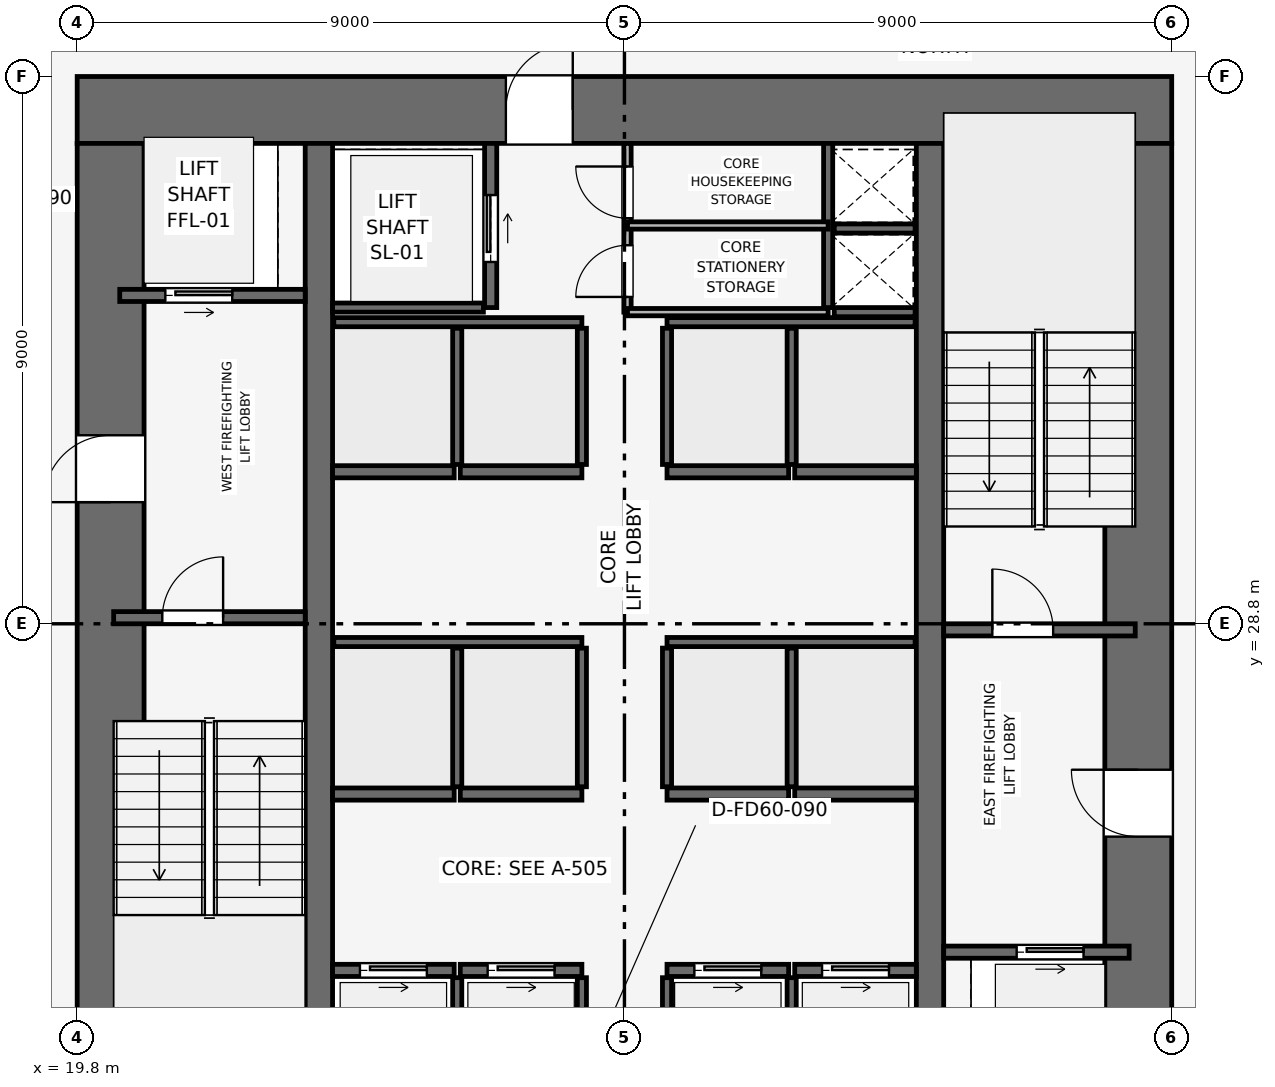
"""IFC4 building model, lengths in metres.
Left out: names, types, materials, properties, quantities, classifications, styles, units other than length and angle.
Written with IfcOpenShell. Run it as: python <this file> out.ifc"""

import sys

from ifc_helpers import new_model, si_unit, direction, frame, frame_2d, origin, place, context, subcontext, project, spatial, rectangle, extrude, element, fill, save


model = new_model("IFC4")
c1 = context("Model", 3, precision=1e-05, world=origin(), true_north=direction((0.0, 1.0)))
c2 = subcontext(c1, "Body", "Model", "MODEL_VIEW")
j1 = project(units=[si_unit("LENGTHUNIT", "METRE"), si_unit("PLANEANGLEUNIT", "RADIAN")], contexts=[c1])
p1 = place(None, origin())
s1 = spatial("IfcSite", under=j1, at=p1, CompositionType="ELEMENT")
p2 = place(p1, origin())
s2 = spatial("IfcBuilding", under=s1, at=p2, CompositionType="ELEMENT")
p3 = place(p2, frame((0.0, 0.0, 92.4)))
s3 = spatial("IfcBuildingStorey", under=s2, at=p3, CompositionType="ELEMENT", Elevation=92.4)
p4 = place(p3, frame((19.8, 37.25, 0.0), z_axis=(0.0, 0.0, 1.0), x_axis=(1.0, 0.0, 0.0)))
e1 = element("IfcWall", 1, at=p4, inside=s3, PredefinedType="SHEAR", context=c2, shape_type="SweptSolid", body=[
    extrude(rectangle(XDim=18.0, YDim=1.1, at=frame_2d((9.0, 0.0))), origin(), (0.0, 0.0, 1.0), 3.9),
])
p5 = place(p4, frame((7.05, 0.0, 0.0)))
e2 = element("IfcOpeningElement", 2, at=p5, cuts=e1, PredefinedType="OPENING", context=c2, shape_type="SweptSolid", body=[
    extrude(rectangle(XDim=1.1, YDim=2.15, at=frame_2d((0.55, 1.075))), frame((0.0, 0.56, 0.0), z_axis=(0.0, -1.0, 0.0), x_axis=(1.0, 0.0, 0.0)), (0.0, 0.0, 1.0), 1.12),
])
p6 = place(p3, frame((20.35, 20.9, 0.0), z_axis=(0.0, 0.0, 1.0), x_axis=(0.0, 1.0, 0.0)))
e3 = element("IfcWall", 3, at=p6, inside=s3, PredefinedType="SHEAR", context=c2, shape_type="SweptSolid", body=[
    extrude(rectangle(XDim=15.8, YDim=1.1, at=frame_2d((7.9, 0.0))), origin(), (0.0, 0.0, 1.0), 3.9),
])
p7 = place(p6, frame((9.9, 0.0, 0.0)))
e4 = element("IfcOpeningElement", 4, at=p7, cuts=e3, PredefinedType="OPENING", context=c2, shape_type="SweptSolid", body=[
    extrude(rectangle(XDim=1.1, YDim=2.15, at=frame_2d((0.55, 1.075))), frame((0.0, 0.56, 0.0), z_axis=(0.0, -1.0, 0.0), x_axis=(1.0, 0.0, 0.0)), (0.0, 0.0, 1.0), 1.12),
])
p8 = place(p3, frame((37.25, 20.9, 0.0), z_axis=(0.0, 0.0, 1.0), x_axis=(0.0, 1.0, 0.0)))
e5 = element("IfcWall", 5, at=p8, inside=s3, PredefinedType="SHEAR", context=c2, shape_type="SweptSolid", body=[
    extrude(rectangle(XDim=15.8, YDim=1.1, at=frame_2d((7.9, 0.0))), origin(), (0.0, 0.0, 1.0), 3.9),
])
p9 = place(p8, frame((4.4, 0.0, 0.0)))
e6 = element("IfcOpeningElement", 6, at=p9, cuts=e5, PredefinedType="OPENING", context=c2, shape_type="SweptSolid", body=[
    extrude(rectangle(XDim=1.1, YDim=2.15, at=frame_2d((0.55, 1.075))), frame((0.0, 0.56, 0.0), z_axis=(0.0, -1.0, 0.0), x_axis=(1.0, 0.0, 0.0)), (0.0, 0.0, 1.0), 1.12),
])
for number, where, z_axis, x_axis in (
    (7, (23.775, 20.9, 0.0), (0.0, 0.0, 1.0), (0.0, 1.0, 0.0)),
    (8, (33.825, 20.9, 0.0), (0.0, 0.0, 1.0), (0.0, 1.0, 0.0)),
):
    element("IfcWall", number, at=place(p3, frame(where, z_axis=z_axis, x_axis=x_axis)), inside=s3, PredefinedType="SHEAR", context=c2, shape_type="SweptSolid", body=[
        extrude(rectangle(XDim=15.8, YDim=0.45, at=frame_2d((7.9, 0.0))), origin(), (0.0, 0.0, 1.0), 3.9),
    ])
p10 = place(p3, frame((20.4, 28.9, 0.0), z_axis=(0.0, 0.0, 1.0), x_axis=(1.0, 0.0, 0.0)))
e9 = element("IfcWall", 9, at=p10, inside=s3, PredefinedType="SHEAR", context=c2, shape_type="SweptSolid", body=[
    extrude(rectangle(XDim=3.15, YDim=0.2, at=frame_2d((1.575, 0.0))), origin(), (0.0, 0.0, 1.0), 3.65),
])
p11 = place(p10, frame((0.8, 0.0, 0.0)))
e10 = element("IfcOpeningElement", 10, at=p11, cuts=e9, PredefinedType="OPENING", context=c2, shape_type="SweptSolid", body=[
    extrude(rectangle(XDim=1.0, YDim=2.1, at=frame_2d((0.5, 1.05))), frame((0.0, 0.11, 0.0), z_axis=(0.0, -1.0, 0.0), x_axis=(1.0, 0.0, 0.0)), (0.0, 0.0, 1.0), 0.22),
])
p12 = place(p3, frame((34.05, 28.7, 0.0), z_axis=(0.0, 0.0, 1.0), x_axis=(1.0, 0.0, 0.0)))
e11 = element("IfcWall", 11, at=p12, inside=s3, PredefinedType="SHEAR", context=c2, shape_type="SweptSolid", body=[
    extrude(rectangle(XDim=3.15, YDim=0.2, at=frame_2d((1.575, 0.0))), origin(), (0.0, 0.0, 1.0), 3.65),
])
p13 = place(p12, frame((0.8, 0.0, 0.0)))
e12 = element("IfcOpeningElement", 12, at=p13, cuts=e11, PredefinedType="OPENING", context=c2, shape_type="SweptSolid", body=[
    extrude(rectangle(XDim=1.0, YDim=2.1, at=frame_2d((0.5, 1.05))), frame((0.0, 0.11, 0.0), z_axis=(0.0, -1.0, 0.0), x_axis=(1.0, 0.0, 0.0)), (0.0, 0.0, 1.0), 0.22),
])
p14 = place(p3, frame((32.15, 34.0, 0.0), z_axis=(0.0, 0.0, 1.0), x_axis=(0.0, 1.0, 0.0)))
e13 = element("IfcWall", 13, at=p14, inside=s3, PredefinedType="SHEAR", context=c2, shape_type="SweptSolid", body=[
    extrude(rectangle(XDim=2.7, YDim=0.15, at=frame_2d((1.35, 0.0))), origin(), (0.0, 0.0, 1.0), 3.65),
])
for number, where, z_axis, x_axis in (
    (14, (32.25, 33.925, 0.0), (0.0, 0.0, 1.0), (1.0, 0.0, 0.0)),
    (15, (32.25, 35.3, 0.0), (0.0, 0.0, 1.0), (1.0, 0.0, 0.0)),
):
    element("IfcWall", number, at=place(p3, frame(where, z_axis=z_axis, x_axis=x_axis)), inside=s3, PredefinedType="SHEAR", context=c2, shape_type="SweptSolid", body=[
        extrude(rectangle(XDim=1.33, YDim=0.15, at=frame_2d((0.665, 0.0))), origin(), (0.0, 0.0, 1.0), 3.65),
    ])
p15 = place(p3, frame((20.5, 34.2, 0.0), z_axis=(0.0, 0.0, 1.0), x_axis=(1.0, 0.0, 0.0)))
e16 = element("IfcWall", 16, at=p15, inside=s3, PredefinedType="SHEAR", context=c2, shape_type="SweptSolid", body=[
    extrude(rectangle(XDim=3.05, YDim=0.2, at=frame_2d((1.525, 0.0))), origin(), (0.0, 0.0, 1.0), 3.65),
])
p16 = place(p15, frame((0.75, 0.0, 0.0)))
e17 = element("IfcOpeningElement", 17, at=p16, cuts=e16, PredefinedType="OPENING", context=c2, shape_type="SweptSolid", body=[
    extrude(rectangle(XDim=1.1, YDim=2.15, at=frame_2d((0.55, 1.075))), frame((0.0, 0.11, 0.0), z_axis=(0.0, -1.0, 0.0), x_axis=(1.0, 0.0, 0.0)), (0.0, 0.0, 1.0), 0.22),
])
p17 = place(p3, frame((34.05, 23.4, 0.0), z_axis=(0.0, 0.0, 1.0), x_axis=(1.0, 0.0, 0.0)))
e18 = element("IfcWall", 18, at=p17, inside=s3, PredefinedType="SHEAR", context=c2, shape_type="SweptSolid", body=[
    extrude(rectangle(XDim=3.05, YDim=0.2, at=frame_2d((1.525, 0.0))), origin(), (0.0, 0.0, 1.0), 3.65),
])
p18 = place(p17, frame((1.2, 0.0, 0.0)))
e19 = element("IfcOpeningElement", 19, at=p18, cuts=e18, PredefinedType="OPENING", context=c2, shape_type="SweptSolid", body=[
    extrude(rectangle(XDim=1.1, YDim=2.15, at=frame_2d((0.55, 1.075))), frame((0.0, 0.11, 0.0), z_axis=(0.0, -1.0, 0.0), x_axis=(1.0, 0.0, 0.0)), (0.0, 0.0, 1.0), 0.22),
])
p19 = place(p3, frame((26.6, 34.0, 0.0), z_axis=(0.0, 0.0, 1.0), x_axis=(0.0, 1.0, 0.0)))
e20 = element("IfcWall", 20, at=p19, inside=s3, PredefinedType="SHEAR", context=c2, shape_type="SweptSolid", body=[
    extrude(rectangle(XDim=2.7, YDim=0.2, at=frame_2d((1.35, 0.0))), origin(), (0.0, 0.0, 1.0), 3.65),
])
p20 = place(p19, frame((0.75, 0.0, 0.0)))
e21 = element("IfcOpeningElement", 21, at=p20, cuts=e20, PredefinedType="OPENING", context=c2, shape_type="SweptSolid", body=[
    extrude(rectangle(XDim=1.1, YDim=2.15, at=frame_2d((0.55, 1.075))), frame((0.0, 0.11, 0.0), z_axis=(0.0, -1.0, 0.0), x_axis=(1.0, 0.0, 0.0)), (0.0, 0.0, 1.0), 0.22),
])
p21 = place(p3, frame((24.0, 34.0, 0.0), z_axis=(0.0, 0.0, 1.0), x_axis=(1.0, 0.0, 0.0)))
e22 = element("IfcWall", 22, at=p21, inside=s3, PredefinedType="SHEAR", context=c2, shape_type="SweptSolid", body=[
    extrude(rectangle(XDim=2.48, YDim=0.15, at=frame_2d((1.24, 0.0))), origin(), (0.0, 0.0, 1.0), 3.65),
])
p22 = place(p3, frame((24.0, 23.1, 0.0), z_axis=(0.0, 0.0, 1.0), x_axis=(1.0, 0.0, 0.0)))
e23 = element("IfcWall", 23, at=p22, inside=s3, PredefinedType="SHEAR", context=c2, shape_type="SweptSolid", body=[
    extrude(rectangle(XDim=2.0, YDim=0.2, at=frame_2d((1.0, 0.0))), origin(), (0.0, 0.0, 1.0), 3.65),
])
p23 = place(p22, frame((0.45, 0.0, 0.0)))
e24 = element("IfcOpeningElement", 24, at=p23, cuts=e23, PredefinedType="OPENING", context=c2, shape_type="SweptSolid", body=[
    extrude(rectangle(XDim=1.1, YDim=2.15, at=frame_2d((0.55, 1.075))), frame((0.0, 0.11, 0.0), z_axis=(0.0, -1.0, 0.0), x_axis=(1.0, 0.0, 0.0)), (0.0, 0.0, 1.0), 0.22),
])
p24 = place(p3, frame((26.1, 23.1, 0.0), z_axis=(0.0, 0.0, 1.0), x_axis=(1.0, 0.0, 0.0)))
e25 = element("IfcWall", 25, at=p24, inside=s3, PredefinedType="SHEAR", context=c2, shape_type="SweptSolid", body=[
    extrude(rectangle(XDim=2.0, YDim=0.2, at=frame_2d((1.0, 0.0))), origin(), (0.0, 0.0, 1.0), 3.65),
])
p25 = place(p24, frame((0.45, 0.0, 0.0)))
e26 = element("IfcOpeningElement", 26, at=p25, cuts=e25, PredefinedType="OPENING", context=c2, shape_type="SweptSolid", body=[
    extrude(rectangle(XDim=1.1, YDim=2.15, at=frame_2d((0.55, 1.075))), frame((0.0, 0.11, 0.0), z_axis=(0.0, -1.0, 0.0), x_axis=(1.0, 0.0, 0.0)), (0.0, 0.0, 1.0), 0.22),
])
p26 = place(p3, frame((29.5, 23.1, 0.0), z_axis=(0.0, 0.0, 1.0), x_axis=(1.0, 0.0, 0.0)))
e27 = element("IfcWall", 27, at=p26, inside=s3, PredefinedType="SHEAR", context=c2, shape_type="SweptSolid", body=[
    extrude(rectangle(XDim=2.0, YDim=0.2, at=frame_2d((1.0, 0.0))), origin(), (0.0, 0.0, 1.0), 3.65),
])
p27 = place(p26, frame((0.45, 0.0, 0.0)))
e28 = element("IfcOpeningElement", 28, at=p27, cuts=e27, PredefinedType="OPENING", context=c2, shape_type="SweptSolid", body=[
    extrude(rectangle(XDim=1.1, YDim=2.15, at=frame_2d((0.55, 1.075))), frame((0.0, 0.11, 0.0), z_axis=(0.0, -1.0, 0.0), x_axis=(1.0, 0.0, 0.0)), (0.0, 0.0, 1.0), 0.22),
])
p28 = place(p3, frame((31.6, 23.1, 0.0), z_axis=(0.0, 0.0, 1.0), x_axis=(1.0, 0.0, 0.0)))
e29 = element("IfcWall", 29, at=p28, inside=s3, PredefinedType="SHEAR", context=c2, shape_type="SweptSolid", body=[
    extrude(rectangle(XDim=2.0, YDim=0.2, at=frame_2d((1.0, 0.0))), origin(), (0.0, 0.0, 1.0), 3.65),
])
p29 = place(p28, frame((0.45, 0.0, 0.0)))
e30 = element("IfcOpeningElement", 30, at=p29, cuts=e29, PredefinedType="OPENING", context=c2, shape_type="SweptSolid", body=[
    extrude(rectangle(XDim=1.1, YDim=2.15, at=frame_2d((0.55, 1.075))), frame((0.0, 0.11, 0.0), z_axis=(0.0, -1.0, 0.0), x_axis=(1.0, 0.0, 0.0)), (0.0, 0.0, 1.0), 0.22),
])
for number, where, z_axis, x_axis in (
    (31, (24.0, 26.0, 0.0), (0.0, 0.0, 1.0), (1.0, 0.0, 0.0)),
    (32, (26.1, 26.0, 0.0), (0.0, 0.0, 1.0), (1.0, 0.0, 0.0)),
    (33, (29.5, 26.0, 0.0), (0.0, 0.0, 1.0), (1.0, 0.0, 0.0)),
    (34, (31.6, 26.0, 0.0), (0.0, 0.0, 1.0), (1.0, 0.0, 0.0)),
    (35, (24.0, 31.3, 0.0), (0.0, 0.0, 1.0), (1.0, 0.0, 0.0)),
    (36, (26.1, 31.3, 0.0), (0.0, 0.0, 1.0), (1.0, 0.0, 0.0)),
    (37, (29.5, 31.3, 0.0), (0.0, 0.0, 1.0), (1.0, 0.0, 0.0)),
    (38, (31.6, 31.3, 0.0), (0.0, 0.0, 1.0), (1.0, 0.0, 0.0)),
):
    element("IfcWall", number, at=place(p3, frame(where, z_axis=z_axis, x_axis=x_axis)), inside=s3, PredefinedType="SHEAR", context=c2, shape_type="SweptSolid", body=[
        extrude(rectangle(XDim=2.0, YDim=0.2, at=frame_2d((1.0, 0.0))), origin(), (0.0, 0.0, 1.0), 3.65),
    ])
for number, where, z_axis, x_axis in (
    (39, (26.05, 20.92, 0.0), (0.0, 0.0, 1.0), (0.0, 1.0, 0.0)),
    (40, (28.1, 20.92, 0.0), (0.0, 0.0, 1.0), (0.0, 1.0, 0.0)),
    (41, (29.5, 20.92, 0.0), (0.0, 0.0, 1.0), (0.0, 1.0, 0.0)),
    (42, (31.55, 20.92, 0.0), (0.0, 0.0, 1.0), (0.0, 1.0, 0.0)),
):
    element("IfcWall", number, at=place(p3, frame(where, z_axis=z_axis, x_axis=x_axis)), inside=s3, PredefinedType="SHEAR", context=c2, shape_type="SweptSolid", body=[
        extrude(rectangle(XDim=2.06, YDim=0.15, at=frame_2d((1.03, 0.0))), origin(), (0.0, 0.0, 1.0), 3.65),
    ])
for number, where, z_axis, x_axis in (
    (43, (24.02, 28.5, 0.0), (0.0, 0.0, 1.0), (1.0, 0.0, 0.0)),
    (44, (29.5, 28.5, 0.0), (0.0, 0.0, 1.0), (1.0, 0.0, 0.0)),
):
    element("IfcWall", number, at=place(p3, frame(where, z_axis=z_axis, x_axis=x_axis)), inside=s3, PredefinedType="SHEAR", context=c2, shape_type="SweptSolid", body=[
        extrude(rectangle(XDim=4.08, YDim=0.15, at=frame_2d((2.04, 0.0))), origin(), (0.0, 0.0, 1.0), 3.65),
    ])
for number, where, z_axis, x_axis in (
    (45, (26.05, 26.12, 0.0), (0.0, 0.0, 1.0), (0.0, 1.0, 0.0)),
    (46, (28.1, 26.12, 0.0), (0.0, 0.0, 1.0), (0.0, 1.0, 0.0)),
    (47, (29.5, 26.12, 0.0), (0.0, 0.0, 1.0), (0.0, 1.0, 0.0)),
    (48, (31.55, 26.12, 0.0), (0.0, 0.0, 1.0), (0.0, 1.0, 0.0)),
):
    element("IfcWall", number, at=place(p3, frame(where, z_axis=z_axis, x_axis=x_axis)), inside=s3, PredefinedType="SHEAR", context=c2, shape_type="SweptSolid", body=[
        extrude(rectangle(XDim=2.28, YDim=0.15, at=frame_2d((1.14, 0.0))), origin(), (0.0, 0.0, 1.0), 3.65),
    ])
for number, where, z_axis, x_axis in (
    (49, (24.02, 33.76, 0.0), (0.0, 0.0, 1.0), (1.0, 0.0, 0.0)),
    (50, (29.5, 33.76, 0.0), (0.0, 0.0, 1.0), (1.0, 0.0, 0.0)),
):
    element("IfcWall", number, at=place(p3, frame(where, z_axis=z_axis, x_axis=x_axis)), inside=s3, PredefinedType="SHEAR", context=c2, shape_type="SweptSolid", body=[
        extrude(rectangle(XDim=4.08, YDim=0.15, at=frame_2d((2.04, 0.0))), origin(), (0.0, 0.0, 1.0), 3.65),
    ])
for number, where, z_axis, x_axis in (
    (51, (26.05, 31.42, 0.0), (0.0, 0.0, 1.0), (0.0, 1.0, 0.0)),
    (52, (28.1, 31.42, 0.0), (0.0, 0.0, 1.0), (0.0, 1.0, 0.0)),
    (53, (29.5, 31.42, 0.0), (0.0, 0.0, 1.0), (0.0, 1.0, 0.0)),
    (54, (31.55, 31.42, 0.0), (0.0, 0.0, 1.0), (0.0, 1.0, 0.0)),
):
    element("IfcWall", number, at=place(p3, frame(where, z_axis=z_axis, x_axis=x_axis)), inside=s3, PredefinedType="SHEAR", context=c2, shape_type="SweptSolid", body=[
        extrude(rectangle(XDim=2.24, YDim=0.15, at=frame_2d((1.12, 0.0))), origin(), (0.0, 0.0, 1.0), 3.65),
    ])
p30 = place(p3, frame((28.85, 33.925, 0.0), z_axis=(0.0, 0.0, 1.0), x_axis=(0.0, 1.0, 0.0)))
e55 = element("IfcWall", 55, at=p30, inside=s3, PredefinedType="PARTITIONING", context=c2, shape_type="SweptSolid", body=[
    extrude(rectangle(XDim=2.775, YDim=0.12, at=frame_2d((1.387, 0.0))), origin(), (0.0, 0.0, 1.0), 3.65),
])
p31 = place(p30, frame((0.25, 0.0, 0.0)))
e56 = element("IfcOpeningElement", 56, at=p31, cuts=e55, PredefinedType="OPENING", context=c2, shape_type="SweptSolid", body=[
    extrude(rectangle(XDim=0.85, YDim=2.1, at=frame_2d((0.425, 1.05))), frame((0.0, 0.07, 0.0), z_axis=(0.0, -1.0, 0.0), x_axis=(1.0, 0.0, 0.0)), (0.0, 0.0, 1.0), 0.14),
])
p32 = place(p30, frame((1.545, 0.0, 0.0)))
e57 = element("IfcOpeningElement", 57, at=p32, cuts=e55, PredefinedType="OPENING", context=c2, shape_type="SweptSolid", body=[
    extrude(rectangle(XDim=0.85, YDim=2.1, at=frame_2d((0.425, 1.05))), frame((0.0, 0.07, 0.0), z_axis=(0.0, -1.0, 0.0), x_axis=(1.0, 0.0, 0.0)), (0.0, 0.0, 1.0), 0.14),
])
for number, where, z_axis, x_axis in (
    (58, (28.85, 35.35, 0.0), (0.0, 0.0, 1.0), (1.0, 0.0, 0.0)),
    (59, (28.85, 33.925, 0.0), (0.0, 0.0, 1.0), (1.0, 0.0, 0.0)),
):
    element("IfcWall", number, at=place(p3, frame(where, z_axis=z_axis, x_axis=x_axis)), inside=s3, PredefinedType="PARTITIONING", context=c2, shape_type="SweptSolid", body=[
        extrude(rectangle(XDim=3.3, YDim=0.12, at=frame_2d((1.65, 0.0))), origin(), (0.0, 0.0, 1.0), 3.65),
    ])
p33 = place(p11, origin())
e60 = element("IfcDoor", 60, at=p33, inside=s3, OperationType="SINGLE_SWING_RIGHT", PredefinedType="DOOR", context=c2, shape_type="SweptSolid", body=[
    extrude(rectangle(XDim=1.0, YDim=2.1, at=frame_2d((0.5, 1.05))), frame((0.0, 0.025, 0.0), z_axis=(0.0, -1.0, 0.0), x_axis=(1.0, 0.0, 0.0)), (0.0, 0.0, 1.0), 0.05),
])
fill(e10, e60)
p34 = place(p13, origin())
e61 = element("IfcDoor", 61, at=p34, inside=s3, OperationType="SINGLE_SWING_LEFT", PredefinedType="DOOR", context=c2, shape_type="SweptSolid", body=[
    extrude(rectangle(XDim=1.0, YDim=2.1, at=frame_2d((0.5, 1.05))), frame((0.0, 0.025, 0.0), z_axis=(0.0, -1.0, 0.0), x_axis=(1.0, 0.0, 0.0)), (0.0, 0.0, 1.0), 0.05),
])
fill(e12, e61)
p35 = place(p16, origin())
e62 = element("IfcDoor", 62, at=p35, inside=s3, OperationType="SLIDING_TO_RIGHT", PredefinedType="DOOR", context=c2, shape_type="SweptSolid", body=[
    extrude(rectangle(XDim=1.1, YDim=2.15, at=frame_2d((0.55, 1.075))), frame((0.0, 0.025, 0.0), z_axis=(0.0, -1.0, 0.0), x_axis=(1.0, 0.0, 0.0)), (0.0, 0.0, 1.0), 0.05),
])
fill(e17, e62)
p36 = place(p18, origin())
e63 = element("IfcDoor", 63, at=p36, inside=s3, OperationType="SLIDING_TO_RIGHT", PredefinedType="DOOR", context=c2, shape_type="SweptSolid", body=[
    extrude(rectangle(XDim=1.1, YDim=2.15, at=frame_2d((0.55, 1.075))), frame((0.0, 0.025, 0.0), z_axis=(0.0, -1.0, 0.0), x_axis=(1.0, 0.0, 0.0)), (0.0, 0.0, 1.0), 0.05),
])
fill(e19, e63)
p37 = place(p20, origin())
e64 = element("IfcDoor", 64, at=p37, inside=s3, OperationType="SLIDING_TO_RIGHT", PredefinedType="DOOR", context=c2, shape_type="SweptSolid", body=[
    extrude(rectangle(XDim=1.1, YDim=2.15, at=frame_2d((0.55, 1.075))), frame((0.0, 0.025, 0.0), z_axis=(0.0, -1.0, 0.0), x_axis=(1.0, 0.0, 0.0)), (0.0, 0.0, 1.0), 0.05),
])
fill(e21, e64)
p38 = place(p23, origin())
e65 = element("IfcDoor", 65, at=p38, inside=s3, OperationType="SLIDING_TO_RIGHT", PredefinedType="DOOR", context=c2, shape_type="SweptSolid", body=[
    extrude(rectangle(XDim=1.1, YDim=2.15, at=frame_2d((0.55, 1.075))), frame((0.0, 0.025, 0.0), z_axis=(0.0, -1.0, 0.0), x_axis=(1.0, 0.0, 0.0)), (0.0, 0.0, 1.0), 0.05),
])
fill(e24, e65)
p39 = place(p25, origin())
e66 = element("IfcDoor", 66, at=p39, inside=s3, OperationType="SLIDING_TO_RIGHT", PredefinedType="DOOR", context=c2, shape_type="SweptSolid", body=[
    extrude(rectangle(XDim=1.1, YDim=2.15, at=frame_2d((0.55, 1.075))), frame((0.0, 0.025, 0.0), z_axis=(0.0, -1.0, 0.0), x_axis=(1.0, 0.0, 0.0)), (0.0, 0.0, 1.0), 0.05),
])
fill(e26, e66)
p40 = place(p27, origin())
e67 = element("IfcDoor", 67, at=p40, inside=s3, OperationType="SLIDING_TO_RIGHT", PredefinedType="DOOR", context=c2, shape_type="SweptSolid", body=[
    extrude(rectangle(XDim=1.1, YDim=2.15, at=frame_2d((0.55, 1.075))), frame((0.0, 0.025, 0.0), z_axis=(0.0, -1.0, 0.0), x_axis=(1.0, 0.0, 0.0)), (0.0, 0.0, 1.0), 0.05),
])
fill(e28, e67)
p41 = place(p29, origin())
e68 = element("IfcDoor", 68, at=p41, inside=s3, OperationType="SLIDING_TO_RIGHT", PredefinedType="DOOR", context=c2, shape_type="SweptSolid", body=[
    extrude(rectangle(XDim=1.1, YDim=2.15, at=frame_2d((0.55, 1.075))), frame((0.0, 0.025, 0.0), z_axis=(0.0, -1.0, 0.0), x_axis=(1.0, 0.0, 0.0)), (0.0, 0.0, 1.0), 0.05),
])
fill(e30, e68)
p42 = place(p31, origin())
e69 = element("IfcDoor", 69, at=p42, inside=s3, OperationType="SINGLE_SWING_LEFT", PredefinedType="DOOR", context=c2, shape_type="SweptSolid", body=[
    extrude(rectangle(XDim=0.85, YDim=2.1, at=frame_2d((0.425, 1.05))), frame((0.0, 0.025, 0.0), z_axis=(0.0, -1.0, 0.0), x_axis=(1.0, 0.0, 0.0)), (0.0, 0.0, 1.0), 0.05),
])
fill(e56, e69)
p43 = place(p32, origin())
e70 = element("IfcDoor", 70, at=p43, inside=s3, OperationType="SINGLE_SWING_RIGHT", PredefinedType="DOOR", context=c2, shape_type="SweptSolid", body=[
    extrude(rectangle(XDim=0.85, YDim=2.1, at=frame_2d((0.425, 1.05))), frame((0.0, 0.025, 0.0), z_axis=(0.0, -1.0, 0.0), x_axis=(1.0, 0.0, 0.0)), (0.0, 0.0, 1.0), 0.05),
])
fill(e57, e70)
p44 = place(p7, origin())
e71 = element("IfcDoor", 71, at=p44, inside=s3, OperationType="SINGLE_SWING_LEFT", PredefinedType="DOOR", context=c2, shape_type="SweptSolid", body=[
    extrude(rectangle(XDim=1.1, YDim=2.15, at=frame_2d((0.55, 1.075))), frame((0.0, 0.025, 0.0), z_axis=(0.0, -1.0, 0.0), x_axis=(1.0, 0.0, 0.0)), (0.0, 0.0, 1.0), 0.05),
])
fill(e4, e71)
p45 = place(p9, origin())
e72 = element("IfcDoor", 72, at=p45, inside=s3, OperationType="SINGLE_SWING_RIGHT", PredefinedType="DOOR", context=c2, shape_type="SweptSolid", body=[
    extrude(rectangle(XDim=1.1, YDim=2.15, at=frame_2d((0.55, 1.075))), frame((0.0, 0.025, 0.0), z_axis=(0.0, -1.0, 0.0), x_axis=(1.0, 0.0, 0.0)), (0.0, 0.0, 1.0), 0.05),
])
fill(e6, e72)
p46 = place(p5, origin())
e73 = element("IfcDoor", 73, at=p46, inside=s3, OperationType="SINGLE_SWING_RIGHT", PredefinedType="DOOR", context=c2, shape_type="SweptSolid", body=[
    extrude(rectangle(XDim=1.1, YDim=2.15, at=frame_2d((0.55, 1.075))), frame((0.0, 0.025, 0.0), z_axis=(0.0, -1.0, 0.0), x_axis=(1.0, 0.0, 0.0)), (0.0, 0.0, 1.0), 0.05),
])
fill(e2, e73)
save(model, sys.argv[1])
